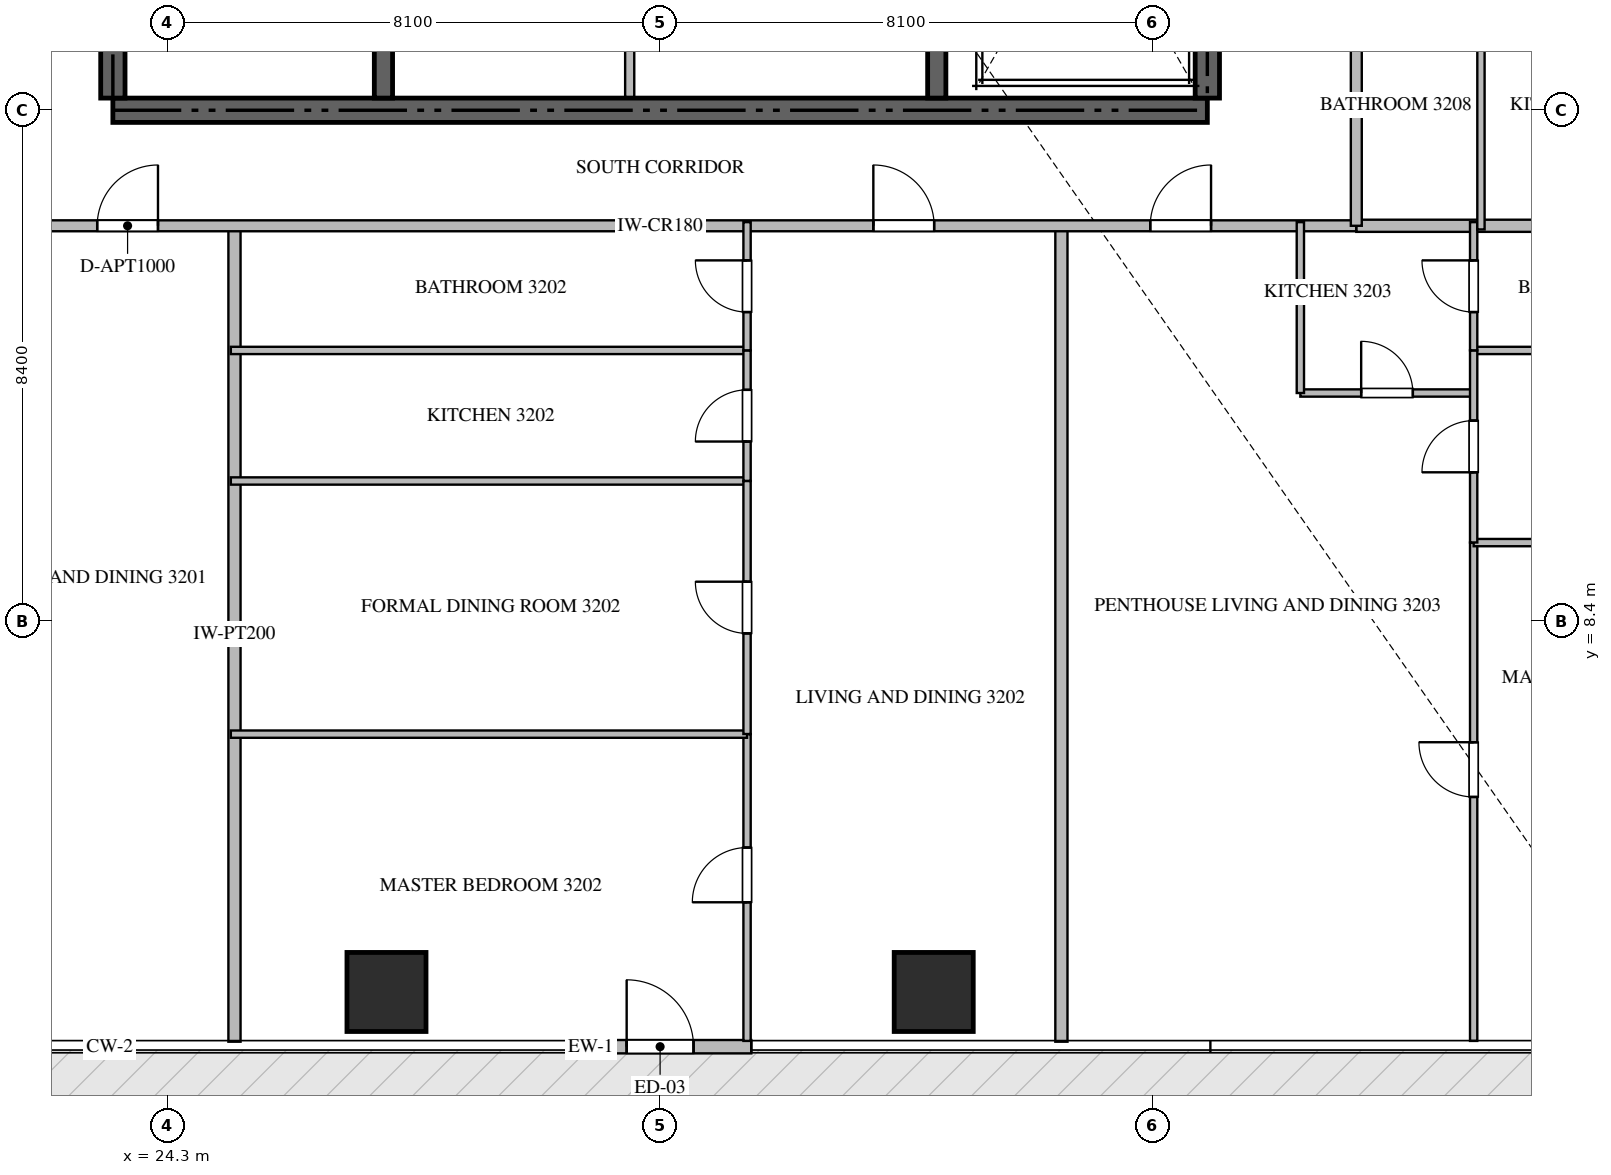
"""IFC4 building model, lengths in metres.
Left out: names, types, materials, properties, quantities, classifications, styles, units other than length and angle.
Written with IfcOpenShell. Run it as: python <this file> out.ifc"""

import sys

from ifc_helpers import new_model, si_unit, direction, frame, frame_2d, origin, origin_2d, place, context, subcontext, project, spatial, rectangle, extrude, source, transform, mapped, element, fill, save


model = new_model("IFC4")
c1 = context("Model", 3, precision=1e-05, world=origin(), true_north=direction((0.0, 1.0)))
c2 = subcontext(c1, "Body", "Model", "MODEL_VIEW")
j1 = project(units=[si_unit("LENGTHUNIT", "METRE"), si_unit("PLANEANGLEUNIT", "RADIAN")], contexts=[c1])
p1 = place(None, origin())
s1 = spatial("IfcSite", under=j1, at=p1, CompositionType="ELEMENT")
p2 = place(p1, origin())
s2 = spatial("IfcBuilding", under=s1, at=p2, CompositionType="ELEMENT")
p3 = place(p2, frame((0.0, 0.0, 131.4)))
s3 = spatial("IfcBuildingStorey", under=s2, at=p3, CompositionType="ELEMENT", Elevation=131.4)
p4 = place(p3, frame((23.4, 16.8, -0.26), z_axis=(0.0, 0.0, 1.0), x_axis=(1.0, 0.0, 0.0)))
e1 = element("IfcWall", 1, at=p4, inside=s3, PredefinedType="SHEAR", context=c2, shape_type="SweptSolid", body=[
    extrude(rectangle(XDim=18.0, YDim=0.4, at=frame_2d((9.0, 0.0))), origin(), (0.0, 0.0, 1.0), 3.748),
])
p5 = place(p3, frame((23.4, 17.0, -0.26), z_axis=(0.0, 0.0, 1.0), x_axis=(0.0, 1.0, 0.0)))
e2 = element("IfcWall", 2, at=p5, inside=s3, PredefinedType="SHEAR", context=c2, shape_type="SweptSolid", body=[
    extrude(rectangle(XDim=4.85, YDim=0.4, at=frame_2d((2.425, 0.0))), origin(), (0.0, 0.0, 1.0), 3.748),
])
p6 = place(p3, frame((41.4, 17.0, -0.26), z_axis=(0.0, 0.0, 1.0), x_axis=(0.0, 1.0, 0.0)))
e3 = element("IfcWall", 3, at=p6, inside=s3, PredefinedType="SHEAR", context=c2, shape_type="SweptSolid", body=[
    extrude(rectangle(XDim=8.35, YDim=0.4, at=frame_2d((4.175, 0.0))), origin(), (0.0, 0.0, 1.0), 3.748),
])
p7 = place(p3, frame((27.85, 17.0, -0.26), z_axis=(0.0, 0.0, 1.0), x_axis=(0.0, 1.0, 0.0)))
e4 = element("IfcWall", 4, at=p7, inside=s3, PredefinedType="SHEAR", context=c2, shape_type="SweptSolid", body=[
    extrude(rectangle(XDim=4.85, YDim=0.3, at=frame_2d((2.425, 0.0))), origin(), (0.0, 0.0, 1.0), 3.748),
])
p8 = place(p3, frame((36.95, 17.0, -0.26), z_axis=(0.0, 0.0, 1.0), x_axis=(0.0, 1.0, 0.0)))
e5 = element("IfcWall", 5, at=p8, inside=s3, PredefinedType="SHEAR", context=c2, shape_type="SweptSolid", body=[
    extrude(rectangle(XDim=8.35, YDim=0.3, at=frame_2d((4.175, 0.0))), origin(), (0.0, 0.0, 1.0), 3.748),
])
m1 = source(origin(), c2, "Body", "SweptSolid", [
    extrude(rectangle(XDim=1.3, YDim=1.3, at=origin_2d()), origin(), (0.0, 0.0, 1.0), 3.75),
])
for number, where, z_axis, x_axis in (
    (6, (27.9, 2.3, -0.26), (0.0, 0.0, 1.0), (1.0, 0.0, 0.0)),
    (7, (36.9, 2.3, -0.26), (0.0, 0.0, 1.0), (1.0, 0.0, 0.0)),
):
    element("IfcColumn", number, at=place(p3, frame(where, z_axis=z_axis, x_axis=x_axis)), inside=s3, PredefinedType="COLUMN", context=c2, shape_type="MappedRepresentation", body=[
        mapped(m1, transform((0.0, 0.0, 0.0), scale=1.0)),
    ])
p9 = place(p3, frame((30.9, 1.4, 0.0), z_axis=(0.0, 0.0, 1.0), x_axis=(1.0, 0.0, 0.0)))
e8 = element("IfcWall", 8, at=p9, inside=s3, PredefinedType="ELEMENTEDWALL", context=c2, shape_type="SweptSolid", body=[
    extrude(rectangle(XDim=3.0, YDim=0.22, at=frame_2d((1.5, 0.0))), origin(), (0.0, 0.0, 1.0), 3.475),
])
p10 = place(p9, frame((0.95, 0.0, 0.0)))
e9 = element("IfcOpeningElement", 9, at=p10, cuts=e8, PredefinedType="OPENING", context=c2, shape_type="SweptSolid", body=[
    extrude(rectangle(XDim=1.1, YDim=2.2, at=frame_2d((0.55, 1.1))), frame((0.0, 0.12, 0.0), z_axis=(0.0, -1.0, 0.0), x_axis=(1.0, 0.0, 0.0)), (0.0, 0.0, 1.0), 0.24),
])
p11 = place(p3, frame((31.9, 17.02, 0.0), z_axis=(0.0, 0.0, 1.0), x_axis=(0.0, 1.0, 0.0)))
e10 = element("IfcWall", 10, at=p11, inside=s3, PredefinedType="PARTITIONING", context=c2, shape_type="SweptSolid", body=[
    extrude(rectangle(XDim=2.73, YDim=0.15, at=frame_2d((1.365, 0.0))), origin(), (0.0, 0.0, 1.0), 3.49),
])
for number, where, z_axis, x_axis in (
    (11, (25.4, 1.482, 0.0), (0.0, 0.0, 1.0), (0.0, 1.0, 0.0)),
    (12, (39.0, 1.482, 0.0), (0.0, 0.0, 1.0), (0.0, 1.0, 0.0)),
):
    element("IfcWall", number, at=place(p3, frame(where, z_axis=z_axis, x_axis=x_axis)), inside=s3, PredefinedType="PARTITIONING", context=c2, shape_type="SweptSolid", body=[
        extrude(rectangle(XDim=13.418, YDim=0.2, at=frame_2d((6.709, 0.0))), origin(), (0.0, 0.0, 1.0), 3.49),
    ])
p12 = place(p3, frame((43.85, 14.9, 0.0), z_axis=(0.0, 0.0, 1.0), x_axis=(1.0, 0.0, 0.0)))
e13 = element("IfcWall", 13, at=p12, inside=s3, PredefinedType="PARTITIONING", context=c2, shape_type="SweptSolid", body=[
    extrude(rectangle(XDim=13.068, YDim=0.2, at=frame_2d((6.534, 0.0))), origin(), (0.0, 0.0, 1.0), 3.49),
])
p13 = place(p3, frame((20.952, 14.9, 0.0), z_axis=(0.0, 0.0, 1.0), x_axis=(1.0, 0.0, 0.0)))
e14 = element("IfcWall", 14, at=p13, inside=s3, PredefinedType="PARTITIONING", context=c2, shape_type="SweptSolid", body=[
    extrude(rectangle(XDim=22.896, YDim=0.18, at=frame_2d((11.448, 0.0))), origin(), (0.0, 0.0, 1.0), 3.49),
])
p14 = place(p13, frame((2.19, 0.0, 0.0)))
e15 = element("IfcOpeningElement", 15, at=p14, cuts=e14, PredefinedType="OPENING", context=c2, shape_type="SweptSolid", body=[
    extrude(rectangle(XDim=1.0, YDim=2.15, at=frame_2d((0.5, 1.075))), frame((0.0, 0.1, 0.0), z_axis=(0.0, -1.0, 0.0), x_axis=(1.0, 0.0, 0.0)), (0.0, 0.0, 1.0), 0.2),
])
p15 = place(p13, frame((14.955, 0.0, 0.0)))
e16 = element("IfcOpeningElement", 16, at=p15, cuts=e14, PredefinedType="OPENING", context=c2, shape_type="SweptSolid", body=[
    extrude(rectangle(XDim=1.0, YDim=2.15, at=frame_2d((0.5, 1.075))), frame((0.0, 0.1, 0.0), z_axis=(0.0, -1.0, 0.0), x_axis=(1.0, 0.0, 0.0)), (0.0, 0.0, 1.0), 0.2),
])
p16 = place(p13, frame((19.509, 0.0, 0.0)))
e17 = element("IfcOpeningElement", 17, at=p16, cuts=e14, PredefinedType="OPENING", context=c2, shape_type="SweptSolid", body=[
    extrude(rectangle(XDim=1.0, YDim=2.15, at=frame_2d((0.5, 1.075))), frame((0.0, 0.1, 0.0), z_axis=(0.0, -1.0, 0.0), x_axis=(1.0, 0.0, 0.0)), (0.0, 0.0, 1.0), 0.2),
])
p17 = place(p3, frame((43.85, 14.9, 0.0), z_axis=(0.0, 0.0, 1.0), x_axis=(0.0, 1.0, 0.0)))
e18 = element("IfcWall", 18, at=p17, inside=s3, PredefinedType="PARTITIONING", context=c2, shape_type="SweptSolid", body=[
    extrude(rectangle(XDim=18.7, YDim=0.18, at=frame_2d((9.35, 0.0))), origin(), (0.0, 0.0, 1.0), 3.49),
])
p18 = place(p17, frame((6.708, 0.0, 0.0)))
e19 = element("IfcOpeningElement", 19, at=p18, cuts=e18, PredefinedType="OPENING", context=c2, shape_type="SweptSolid", body=[
    extrude(rectangle(XDim=1.0, YDim=2.15, at=frame_2d((0.5, 1.075))), frame((0.0, 0.1, 0.0), z_axis=(0.0, -1.0, 0.0), x_axis=(1.0, 0.0, 0.0)), (0.0, 0.0, 1.0), 0.2),
])
p19 = place(p17, frame((15.134, 0.0, 0.0)))
e20 = element("IfcOpeningElement", 20, at=p19, cuts=e18, PredefinedType="OPENING", context=c2, shape_type="SweptSolid", body=[
    extrude(rectangle(XDim=1.0, YDim=2.15, at=frame_2d((0.5, 1.075))), frame((0.0, 0.1, 0.0), z_axis=(0.0, -1.0, 0.0), x_axis=(1.0, 0.0, 0.0)), (0.0, 0.0, 1.0), 0.2),
])
p20 = place(p3, frame((33.83, 1.495, 0.0), z_axis=(0.0, 0.0, 1.0), x_axis=(0.0, 1.0, 0.0)))
e21 = element("IfcWall", 21, at=p20, inside=s3, PredefinedType="PARTITIONING", context=c2, shape_type="SweptSolid", body=[
    extrude(rectangle(XDim=5.045, YDim=0.12, at=frame_2d((2.522, 0.0))), origin(), (0.0, 0.0, 1.0), 3.49),
])
p21 = place(p20, frame((2.28, 0.0, 0.0)))
e22 = element("IfcOpeningElement", 22, at=p21, cuts=e21, PredefinedType="OPENING", context=c2, shape_type="SweptSolid", body=[
    extrude(rectangle(XDim=0.9, YDim=2.1, at=frame_2d((0.45, 1.05))), frame((0.0, 0.07, 0.0), z_axis=(0.0, -1.0, 0.0), x_axis=(1.0, 0.0, 0.0)), (0.0, 0.0, 1.0), 0.14),
])
for number, where, z_axis, x_axis in (
    (23, (25.34, 6.54, 0.0), (0.0, 0.0, 1.0), (1.0, 0.0, 0.0)),
    (24, (25.34, 10.703, 0.0), (0.0, 0.0, 1.0), (1.0, 0.0, 0.0)),
    (25, (25.34, 12.85, 0.0), (0.0, 0.0, 1.0), (1.0, 0.0, 0.0)),
):
    element("IfcWall", number, at=place(p3, frame(where, z_axis=z_axis, x_axis=x_axis)), inside=s3, PredefinedType="PARTITIONING", context=c2, shape_type="SweptSolid", body=[
        extrude(rectangle(XDim=8.49, YDim=0.12, at=frame_2d((4.245, 0.0))), origin(), (0.0, 0.0, 1.0), 3.49),
    ])
p22 = place(p3, frame((33.83, 6.542, 0.0), z_axis=(0.0, 0.0, 1.0), x_axis=(0.0, 1.0, 0.0)))
e26 = element("IfcWall", 26, at=p22, inside=s3, PredefinedType="PARTITIONING", context=c2, shape_type="SweptSolid", body=[
    extrude(rectangle(XDim=4.161, YDim=0.12, at=frame_2d((2.081, 0.0))), origin(), (0.0, 0.0, 1.0), 3.49),
])
p23 = place(p22, frame((1.655, 0.0, 0.0)))
e27 = element("IfcOpeningElement", 27, at=p23, cuts=e26, PredefinedType="OPENING", context=c2, shape_type="SweptSolid", body=[
    extrude(rectangle(XDim=0.85, YDim=2.1, at=frame_2d((0.425, 1.05))), frame((0.0, 0.07, 0.0), z_axis=(0.0, -1.0, 0.0), x_axis=(1.0, 0.0, 0.0)), (0.0, 0.0, 1.0), 0.14),
])
p24 = place(p3, frame((33.83, 10.705, 0.0), z_axis=(0.0, 0.0, 1.0), x_axis=(0.0, 1.0, 0.0)))
e28 = element("IfcWall", 28, at=p24, inside=s3, PredefinedType="PARTITIONING", context=c2, shape_type="SweptSolid", body=[
    extrude(rectangle(XDim=2.145, YDim=0.12, at=frame_2d((1.073, 0.0))), origin(), (0.0, 0.0, 1.0), 3.49),
])
p25 = place(p24, frame((0.647, 0.0, 0.0)))
e29 = element("IfcOpeningElement", 29, at=p25, cuts=e28, PredefinedType="OPENING", context=c2, shape_type="SweptSolid", body=[
    extrude(rectangle(XDim=0.85, YDim=2.1, at=frame_2d((0.425, 1.05))), frame((0.0, 0.07, 0.0), z_axis=(0.0, -1.0, 0.0), x_axis=(1.0, 0.0, 0.0)), (0.0, 0.0, 1.0), 0.14),
])
p26 = place(p3, frame((33.83, 12.852, 0.0), z_axis=(0.0, 0.0, 1.0), x_axis=(0.0, 1.0, 0.0)))
e30 = element("IfcWall", 30, at=p26, inside=s3, PredefinedType="PARTITIONING", context=c2, shape_type="SweptSolid", body=[
    extrude(rectangle(XDim=2.108, YDim=0.12, at=frame_2d((1.054, 0.0))), origin(), (0.0, 0.0, 1.0), 3.49),
])
p27 = place(p26, frame((0.629, 0.0, 0.0)))
e31 = element("IfcOpeningElement", 31, at=p27, cuts=e30, PredefinedType="OPENING", context=c2, shape_type="SweptSolid", body=[
    extrude(rectangle(XDim=0.85, YDim=2.1, at=frame_2d((0.425, 1.05))), frame((0.0, 0.07, 0.0), z_axis=(0.0, -1.0, 0.0), x_axis=(1.0, 0.0, 0.0)), (0.0, 0.0, 1.0), 0.14),
])
p28 = place(p3, frame((42.93, 12.15, 0.0), z_axis=(0.0, 0.0, 1.0), x_axis=(1.0, 0.0, 0.0)))
e32 = element("IfcWall", 32, at=p28, inside=s3, PredefinedType="PARTITIONING", context=c2, shape_type="SweptSolid", body=[
    extrude(rectangle(XDim=2.85, YDim=0.12, at=frame_2d((1.425, 0.0))), origin(), (0.0, 0.0, 1.0), 3.49),
])
p29 = place(p28, frame((1.0, 0.0, 0.0)))
e33 = element("IfcOpeningElement", 33, at=p29, cuts=e32, PredefinedType="OPENING", context=c2, shape_type="SweptSolid", body=[
    extrude(rectangle(XDim=0.85, YDim=2.1, at=frame_2d((0.425, 1.05))), frame((0.0, 0.07, 0.0), z_axis=(0.0, -1.0, 0.0), x_axis=(1.0, 0.0, 0.0)), (0.0, 0.0, 1.0), 0.14),
])
p30 = place(p3, frame((42.93, 12.15, 0.0), z_axis=(0.0, 0.0, 1.0), x_axis=(0.0, 1.0, 0.0)))
e34 = element("IfcWall", 34, at=p30, inside=s3, PredefinedType="PARTITIONING", context=c2, shape_type="SweptSolid", body=[
    extrude(rectangle(XDim=2.81, YDim=0.12, at=frame_2d((1.405, 0.0))), origin(), (0.0, 0.0, 1.0), 3.49),
])
p31 = place(p3, frame((45.78, 1.495, 0.0), z_axis=(0.0, 0.0, 1.0), x_axis=(0.0, 1.0, 0.0)))
e35 = element("IfcWall", 35, at=p31, inside=s3, PredefinedType="PARTITIONING", context=c2, shape_type="SweptSolid", body=[
    extrude(rectangle(XDim=8.195, YDim=0.12, at=frame_2d((4.097, 0.0))), origin(), (0.0, 0.0, 1.0), 3.49),
])
p32 = place(p31, frame((4.012, 0.0, 0.0)))
e36 = element("IfcOpeningElement", 36, at=p32, cuts=e35, PredefinedType="OPENING", context=c2, shape_type="SweptSolid", body=[
    extrude(rectangle(XDim=0.9, YDim=2.1, at=frame_2d((0.45, 1.05))), frame((0.0, 0.07, 0.0), z_axis=(0.0, -1.0, 0.0), x_axis=(1.0, 0.0, 0.0)), (0.0, 0.0, 1.0), 0.14),
])
p33 = place(p3, frame((45.78, 9.69, 0.0), z_axis=(0.0, 0.0, 1.0), x_axis=(1.0, 0.0, 0.0)))
e37 = element("IfcWall", 37, at=p33, inside=s3, PredefinedType="PARTITIONING", context=c2, shape_type="SweptSolid", body=[
    extrude(rectangle(XDim=11.125, YDim=0.12, at=frame_2d((5.562, 0.0))), origin(), (0.0, 0.0, 1.0), 3.49),
])
p34 = place(p3, frame((45.78, 12.85, 0.0), z_axis=(0.0, 0.0, 1.0), x_axis=(1.0, 0.0, 0.0)))
e38 = element("IfcWall", 38, at=p34, inside=s3, PredefinedType="PARTITIONING", context=c2, shape_type="SweptSolid", body=[
    extrude(rectangle(XDim=3.2, YDim=0.12, at=frame_2d((1.6, 0.0))), origin(), (0.0, 0.0, 1.0), 3.49),
])
p35 = place(p3, frame((45.78, 9.692, 0.0), z_axis=(0.0, 0.0, 1.0), x_axis=(0.0, 1.0, 0.0)))
e39 = element("IfcWall", 39, at=p35, inside=s3, PredefinedType="PARTITIONING", context=c2, shape_type="SweptSolid", body=[
    extrude(rectangle(XDim=3.158, YDim=0.12, at=frame_2d((1.579, 0.0))), origin(), (0.0, 0.0, 1.0), 3.49),
])
p36 = place(p35, frame((1.154, 0.0, 0.0)))
e40 = element("IfcOpeningElement", 40, at=p36, cuts=e39, PredefinedType="OPENING", context=c2, shape_type="SweptSolid", body=[
    extrude(rectangle(XDim=0.85, YDim=2.1, at=frame_2d((0.425, 1.05))), frame((0.0, 0.07, 0.0), z_axis=(0.0, -1.0, 0.0), x_axis=(1.0, 0.0, 0.0)), (0.0, 0.0, 1.0), 0.14),
])
p37 = place(p3, frame((45.78, 12.852, 0.0), z_axis=(0.0, 0.0, 1.0), x_axis=(0.0, 1.0, 0.0)))
e41 = element("IfcWall", 41, at=p37, inside=s3, PredefinedType="PARTITIONING", context=c2, shape_type="SweptSolid", body=[
    extrude(rectangle(XDim=2.108, YDim=0.12, at=frame_2d((1.054, 0.0))), origin(), (0.0, 0.0, 1.0), 3.49),
])
p38 = place(p37, frame((0.629, 0.0, 0.0)))
e42 = element("IfcOpeningElement", 42, at=p38, cuts=e41, PredefinedType="OPENING", context=c2, shape_type="SweptSolid", body=[
    extrude(rectangle(XDim=0.85, YDim=2.1, at=frame_2d((0.425, 1.05))), frame((0.0, 0.07, 0.0), z_axis=(0.0, -1.0, 0.0), x_axis=(1.0, 0.0, 0.0)), (0.0, 0.0, 1.0), 0.14),
])
p39 = place(p3, frame((45.9, 14.84, 0.0), z_axis=(0.0, 0.0, 1.0), x_axis=(0.0, 1.0, 0.0)))
e43 = element("IfcWall", 43, at=p39, inside=s3, PredefinedType="PARTITIONING", context=c2, shape_type="SweptSolid", body=[
    extrude(rectangle(XDim=4.56, YDim=0.12, at=frame_2d((2.28, 0.0))), origin(), (0.0, 0.0, 1.0), 3.49),
])
m2 = source(origin(), c2, "Body", "SweptSolid", [
    extrude(rectangle(XDim=1.1, YDim=2.2, at=frame_2d((0.55, 1.1))), frame((0.0, 0.025, 0.0), z_axis=(0.0, -1.0, 0.0), x_axis=(1.0, 0.0, 0.0)), (0.0, 0.0, 1.0), 0.05),
])
p40 = place(p10, origin())
e44 = element("IfcDoor", 44, at=p40, inside=s3, OperationType="SINGLE_SWING_LEFT", PredefinedType="DOOR", context=c2, shape_type="MappedRepresentation", body=[
    mapped(m2, transform((0.0, 0.0, 0.0), scale=1.0)),
])
fill(e9, e44)
m3 = source(origin(), c2, "Body", "SweptSolid", [
    extrude(rectangle(XDim=1.0, YDim=2.15, at=frame_2d((0.5, 1.075))), frame((0.0, 0.025, 0.0), z_axis=(0.0, -1.0, 0.0), x_axis=(1.0, 0.0, 0.0)), (0.0, 0.0, 1.0), 0.05),
])
p41 = place(p14, origin())
e45 = element("IfcDoor", 45, at=p41, inside=s3, OperationType="SINGLE_SWING_RIGHT", PredefinedType="DOOR", context=c2, shape_type="MappedRepresentation", body=[
    mapped(m3, transform((0.0, 0.0, 0.0), scale=1.0)),
])
fill(e15, e45)
p42 = place(p15, origin())
e46 = element("IfcDoor", 46, at=p42, inside=s3, OperationType="SINGLE_SWING_LEFT", PredefinedType="DOOR", context=c2, shape_type="MappedRepresentation", body=[
    mapped(m3, transform((0.0, 0.0, 0.0), scale=1.0)),
])
fill(e16, e46)
p43 = place(p16, origin())
e47 = element("IfcDoor", 47, at=p43, inside=s3, OperationType="SINGLE_SWING_RIGHT", PredefinedType="DOOR", context=c2, shape_type="MappedRepresentation", body=[
    mapped(m3, transform((0.0, 0.0, 0.0), scale=1.0)),
])
fill(e17, e47)
m4 = source(origin(), c2, "Body", "SweptSolid", [
    extrude(rectangle(XDim=0.9, YDim=2.1, at=frame_2d((0.45, 1.05))), frame((0.0, 0.025, 0.0), z_axis=(0.0, -1.0, 0.0), x_axis=(1.0, 0.0, 0.0)), (0.0, 0.0, 1.0), 0.05),
])
p44 = place(p21, origin())
e48 = element("IfcDoor", 48, at=p44, inside=s3, OperationType="SINGLE_SWING_LEFT", PredefinedType="DOOR", context=c2, shape_type="MappedRepresentation", body=[
    mapped(m4, transform((0.0, 0.0, 0.0), scale=1.0)),
])
fill(e22, e48)
m5 = source(origin(), c2, "Body", "SweptSolid", [
    extrude(rectangle(XDim=0.85, YDim=2.1, at=frame_2d((0.425, 1.05))), frame((0.0, 0.025, 0.0), z_axis=(0.0, -1.0, 0.0), x_axis=(1.0, 0.0, 0.0)), (0.0, 0.0, 1.0), 0.05),
])
p45 = place(p23, origin())
e49 = element("IfcDoor", 49, at=p45, inside=s3, OperationType="SINGLE_SWING_RIGHT", PredefinedType="DOOR", context=c2, shape_type="MappedRepresentation", body=[
    mapped(m5, transform((0.0, 0.0, 0.0), scale=1.0)),
])
fill(e27, e49)
p46 = place(p25, origin())
e50 = element("IfcDoor", 50, at=p46, inside=s3, OperationType="SINGLE_SWING_LEFT", PredefinedType="DOOR", context=c2, shape_type="MappedRepresentation", body=[
    mapped(m5, transform((0.0, 0.0, 0.0), scale=1.0)),
])
fill(e29, e50)
p47 = place(p27, origin())
e51 = element("IfcDoor", 51, at=p47, inside=s3, OperationType="SINGLE_SWING_RIGHT", PredefinedType="DOOR", context=c2, shape_type="MappedRepresentation", body=[
    mapped(m5, transform((0.0, 0.0, 0.0), scale=1.0)),
])
fill(e31, e51)
p48 = place(p29, origin())
e52 = element("IfcDoor", 52, at=p48, inside=s3, OperationType="SINGLE_SWING_LEFT", PredefinedType="DOOR", context=c2, shape_type="MappedRepresentation", body=[
    mapped(m5, transform((0.0, 0.0, 0.0), scale=1.0)),
])
fill(e33, e52)
p49 = place(p32, origin())
e53 = element("IfcDoor", 53, at=p49, inside=s3, OperationType="SINGLE_SWING_RIGHT", PredefinedType="DOOR", context=c2, shape_type="MappedRepresentation", body=[
    mapped(m4, transform((0.0, 0.0, 0.0), scale=1.0)),
])
fill(e36, e53)
p50 = place(p36, origin())
e54 = element("IfcDoor", 54, at=p50, inside=s3, OperationType="SINGLE_SWING_LEFT", PredefinedType="DOOR", context=c2, shape_type="MappedRepresentation", body=[
    mapped(m5, transform((0.0, 0.0, 0.0), scale=1.0)),
])
fill(e40, e54)
p51 = place(p38, origin())
e55 = element("IfcDoor", 55, at=p51, inside=s3, OperationType="SINGLE_SWING_RIGHT", PredefinedType="DOOR", context=c2, shape_type="MappedRepresentation", body=[
    mapped(m5, transform((0.0, 0.0, 0.0), scale=1.0)),
])
fill(e42, e55)
save(model, sys.argv[1])
